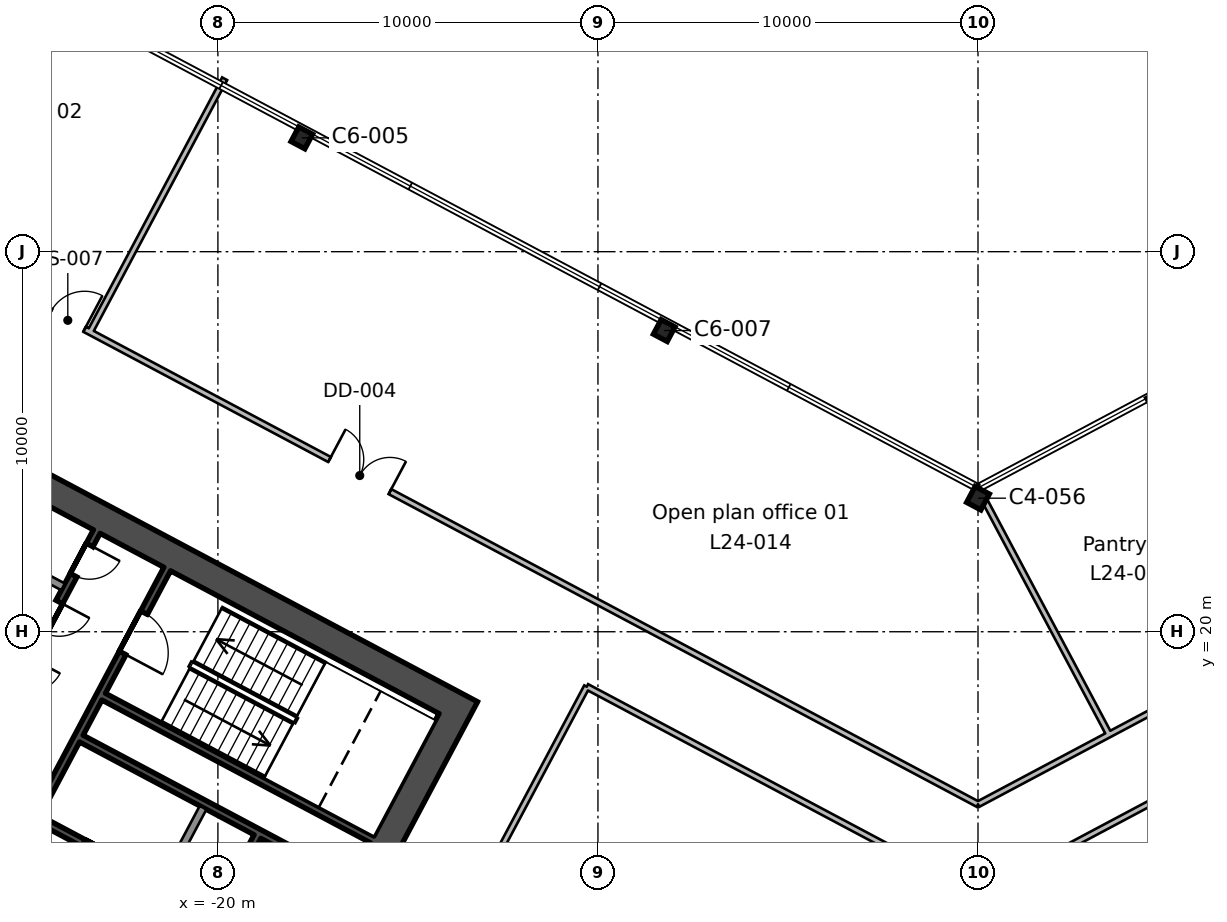
"""IFC4 building model, lengths in metres.
Left out: names, types, materials, properties, quantities, classifications, styles, units other than length and angle.
Written with IfcOpenShell. Run it as: python <this file> out.ifc"""

import sys

from ifc_helpers import new_model, si_unit, direction, frame, frame_2d, origin, origin_2d, place, context, subcontext, project, spatial, rectangle, i_section, extrude, element, fill, save


model = new_model("IFC4")
c1 = context("Model", 3, precision=1e-05, world=origin(), true_north=direction((0.0, 1.0)))
c2 = subcontext(c1, "Body", "Model", "MODEL_VIEW")
j1 = project(units=[si_unit("LENGTHUNIT", "METRE"), si_unit("PLANEANGLEUNIT", "RADIAN")], contexts=[c1])
p1 = place(None, origin())
s1 = spatial("IfcSite", under=j1, at=p1, CompositionType="ELEMENT")
p2 = place(p1, origin())
s2 = spatial("IfcBuilding", under=s1, at=p2, CompositionType="ELEMENT")
p3 = place(p2, frame((0.0, 0.0, 122.2)))
s3 = spatial("IfcBuildingStorey", under=s2, at=p3, CompositionType="ELEMENT", Elevation=122.2)
p4 = place(p3, frame((0.0, 23.514, 0.0), z_axis=(0.0, 0.0, 1.0), x_axis=(-0.882947592859, 0.469471562786, 0.0)))
e1 = element("IfcColumn", 1, at=p4, inside=s3, PredefinedType="COLUMN", context=c2, shape_type="SweptSolid", body=[
    extrude(i_section(OverallWidth=0.424, OverallDepth=0.475, WebThickness=0.048, FlangeThickness=0.077, FilletRadius=0.015, at=origin_2d()), origin(), (0.0, 0.0, 1.0), 4.0),
])
for number, where, z_axis, x_axis in (
    (2, (4.725, 26.047, 0.0), (0.0, 0.0, 1.0), (-0.883, -0.469, 0.0)),
    (3, (-8.257, 27.925, 0.0), (0.0, 0.0, 1.0), (-0.883, 0.469, 0.0)),
    (4, (-17.792, 32.995, 0.0), (0.0, 0.0, 1.0), (-0.883, 0.469, 0.0)),
):
    element("IfcColumn", number, at=place(p3, frame(where, z_axis=z_axis, x_axis=x_axis)), inside=s3, PredefinedType="COLUMN", context=c2, shape_type="SweptSolid", body=[
        extrude(i_section(OverallWidth=0.412, OverallDepth=0.434, WebThickness=0.036, FlangeThickness=0.057, FilletRadius=0.015, at=origin_2d()), origin(), (0.0, 0.0, 1.0), 4.0),
    ])
p5 = place(p3, frame((-13.498, 18.333, 0.0), z_axis=(0.0, 0.0, 1.0), x_axis=(-0.469469918705, -0.88294846703, 0.0)))
e5 = element("IfcWall", 5, at=p5, inside=s3, PredefinedType="SHEAR", context=c2, shape_type="SweptSolid", body=[
    extrude(rectangle(XDim=19.7, YDim=0.75, at=frame_2d((9.85, 0.0))), origin(), (0.0, 0.0, 1.0), 4.0),
])
p6 = place(p5, frame((6.85, 0.0, 0.0)))
e6 = element("IfcOpeningElement", 6, at=p6, cuts=e5, PredefinedType="OPENING", context=c2, shape_type="SweptSolid", body=[
    extrude(rectangle(XDim=2.4, YDim=2.4, at=frame_2d((1.2, 1.2))), frame((0.0, 0.385, 0.0), z_axis=(0.0, -1.0, 0.0), x_axis=(1.0, 0.0, 0.0)), (0.0, 0.0, 1.0), 0.77),
])
p7 = place(p3, frame((-14.005, 18.178, 0.0), z_axis=(0.0, 0.0, 1.0), x_axis=(-0.88295010195, 0.469466843842, 0.0)))
e7 = element("IfcWall", 7, at=p7, inside=s3, PredefinedType="SHEAR", context=c2, shape_type="SweptSolid", body=[
    extrude(rectangle(XDim=20.2, YDim=0.75, at=frame_2d((10.1, 0.0))), origin(), (0.0, 0.0, 1.0), 4.0),
])
p8 = place(p3, frame((-18.96, 14.611, 0.0), z_axis=(0.0, 0.0, 1.0), x_axis=(-0.4694473164, -0.882960484464, 0.0)))
e8 = element("IfcWall", 8, at=p8, inside=s3, PredefinedType="SHEAR", context=c2, shape_type="SweptSolid", body=[
    extrude(rectangle(XDim=2.2, YDim=0.2, at=frame_2d((1.1, 0.0))), origin(), (0.0, 0.0, 1.0), 4.0),
])
p9 = place(p3, frame((-20.39, 15.372, 0.0), z_axis=(0.0, 0.0, 1.0), x_axis=(-0.4694473164, -0.882960484464, 0.0)))
e9 = element("IfcWall", 9, at=p9, inside=s3, PredefinedType="SOLIDWALL", context=c2, shape_type="SweptSolid", body=[
    extrude(rectangle(XDim=2.2, YDim=0.2, at=frame_2d((1.1, 0.0))), origin(), (0.0, 0.0, 1.0), 4.0),
])
p10 = place(p3, frame((-21.333, 21.649, 0.0), z_axis=(0.0, 0.0, 1.0), x_axis=(-0.469494272526, -0.882935517501, 0.0)))
e10 = element("IfcWall", 10, at=p10, inside=s3, PredefinedType="SHEAR", context=c2, shape_type="SweptSolid", body=[
    extrude(rectangle(XDim=7.3, YDim=0.2, at=frame_2d((3.65, 0.0))), origin(), (0.0, 0.0, 1.0), 4.0),
])
p11 = place(p10, frame((1.3, 0.0, 0.0)))
e11 = element("IfcOpeningElement", 11, at=p11, cuts=e10, PredefinedType="OPENING", context=c2, shape_type="SweptSolid", body=[
    extrude(rectangle(XDim=1.2, YDim=2.1, at=frame_2d((0.6, 1.05))), frame((0.0, 0.11, 0.0), z_axis=(0.0, -1.0, 0.0), x_axis=(1.0, 0.0, 0.0)), (0.0, 0.0, 1.0), 0.22),
])
p12 = place(p3, frame((-23.188, 22.635, 0.0), z_axis=(0.0, 0.0, 1.0), x_axis=(-0.469454336211, -0.882956752176, 0.0)))
e12 = element("IfcWall", 12, at=p12, inside=s3, PredefinedType="SHEAR", context=c2, shape_type="SweptSolid", body=[
    extrude(rectangle(XDim=7.3, YDim=0.2, at=frame_2d((3.65, 0.0))), origin(), (0.0, 0.0, 1.0), 4.0),
])
p13 = place(p12, frame((0.4, 0.0, 0.0)))
e13 = element("IfcOpeningElement", 13, at=p13, cuts=e12, PredefinedType="OPENING", context=c2, shape_type="SweptSolid", body=[
    extrude(rectangle(XDim=0.9, YDim=2.1, at=frame_2d((0.45, 1.05))), frame((0.0, 0.11, 0.0), z_axis=(0.0, -1.0, 0.0), x_axis=(1.0, 0.0, 0.0)), (0.0, 0.0, 1.0), 0.22),
])
p14 = place(p12, frame((2.1, 0.0, 0.0)))
e14 = element("IfcOpeningElement", 14, at=p14, cuts=e12, PredefinedType="OPENING", context=c2, shape_type="SweptSolid", body=[
    extrude(rectangle(XDim=0.9, YDim=2.1, at=frame_2d((0.45, 1.05))), frame((0.0, 0.11, 0.0), z_axis=(0.0, -1.0, 0.0), x_axis=(1.0, 0.0, 0.0)), (0.0, 0.0, 1.0), 0.22),
])
p15 = place(p12, frame((3.75, 0.0, 0.0)))
e15 = element("IfcOpeningElement", 15, at=p15, cuts=e12, PredefinedType="OPENING", context=c2, shape_type="SweptSolid", body=[
    extrude(rectangle(XDim=0.9, YDim=2.1, at=frame_2d((0.45, 1.05))), frame((0.0, 0.11, 0.0), z_axis=(0.0, -1.0, 0.0), x_axis=(1.0, 0.0, 0.0)), (0.0, 0.0, 1.0), 0.22),
])
p16 = place(p3, frame((-24.074, 21.181, 0.0), z_axis=(0.0, 0.0, 1.0), x_axis=(-0.882953967957, 0.469459572775, 0.0)))
e16 = element("IfcWall", 16, at=p16, inside=s3, PredefinedType="SOLIDWALL", context=c2, shape_type="SweptSolid", body=[
    extrude(rectangle(XDim=5.2, YDim=0.2, at=frame_2d((2.6, 0.0))), origin(), (0.0, 0.0, 1.0), 4.0),
])
p17 = place(p3, frame((-15.942, 14.536, 0.0), z_axis=(0.0, 0.0, 1.0), x_axis=(-0.882946947542, 0.469472776449, 0.0)))
e17 = element("IfcWall", 17, at=p17, inside=s3, PredefinedType="SHEAR", context=c2, shape_type="SweptSolid", body=[
    extrude(rectangle(XDim=8.0, YDim=0.2, at=frame_2d((4.0, 0.0))), origin(), (0.0, 0.0, 1.0), 4.0),
])
p18 = place(p3, frame((-16.529, 13.432, 0.0), z_axis=(0.0, 0.0, 1.0), x_axis=(-0.88295287151, 0.469461634952, 0.0)))
e18 = element("IfcWall", 18, at=p18, inside=s3, PredefinedType="SHEAR", context=c2, shape_type="SweptSolid", body=[
    extrude(rectangle(XDim=8.0, YDim=0.2, at=frame_2d((4.0, 0.0))), origin(), (0.0, 0.0, 1.0), 4.0),
])
p19 = place(p3, frame((-20.04, 12.581, 0.0), z_axis=(0.0, 0.0, 1.0), x_axis=(-0.882942972946, 0.469480251476, 0.0)))
e19 = element("IfcWall", 19, at=p19, inside=s3, PredefinedType="SHEAR", context=c2, shape_type="SweptSolid", body=[
    extrude(rectangle(XDim=5.4, YDim=0.2, at=frame_2d((2.7, 0.0))), origin(), (0.0, 0.0, 1.0), 4.0),
])
p20 = place(p19, frame((0.36, 0.0, 0.0)))
e20 = element("IfcOpeningElement", 20, at=p20, cuts=e19, PredefinedType="OPENING", context=c2, shape_type="SweptSolid", body=[
    extrude(rectangle(XDim=0.9, YDim=2.1, at=frame_2d((0.45, 1.05))), frame((0.0, 0.11, 0.0), z_axis=(0.0, -1.0, 0.0), x_axis=(1.0, 0.0, 0.0)), (0.0, 0.0, 1.0), 0.22),
])
p21 = place(p19, frame((3.06, 0.0, 0.0)))
e21 = element("IfcOpeningElement", 21, at=p21, cuts=e19, PredefinedType="OPENING", context=c2, shape_type="SweptSolid", body=[
    extrude(rectangle(XDim=0.9, YDim=2.1, at=frame_2d((0.45, 1.05))), frame((0.0, 0.11, 0.0), z_axis=(0.0, -1.0, 0.0), x_axis=(1.0, 0.0, 0.0)), (0.0, 0.0, 1.0), 0.22),
])
p22 = place(p3, frame((-32.47, 32.724, 0.0), z_axis=(0.0, 0.0, 1.0), x_axis=(0.88295243426, -0.469462457321, 0.0)))
e22 = element("IfcWall", 22, at=p22, inside=s3, PredefinedType="PARTITIONING", context=c2, shape_type="SweptSolid", body=[
    extrude(rectangle(XDim=36.774, YDim=0.15, at=frame_2d((18.387, 0.0))), origin(), (0.0, 0.0, 1.0), 3.64),
])
p23 = place(p22, frame((17.45, 0.0, 0.0)))
e23 = element("IfcOpeningElement", 23, at=p23, cuts=e22, PredefinedType="OPENING", context=c2, shape_type="SweptSolid", body=[
    extrude(rectangle(XDim=1.8, YDim=2.1, at=frame_2d((0.9, 1.05))), frame((0.0, 0.085, 0.0), z_axis=(0.0, -1.0, 0.0), x_axis=(1.0, 0.0, 0.0)), (0.0, 0.0, 1.0), 0.17),
])
p24 = place(p22, frame((9.15, 0.0, 0.0)))
e24 = element("IfcOpeningElement", 24, at=p24, cuts=e22, PredefinedType="OPENING", context=c2, shape_type="SweptSolid", body=[
    extrude(rectangle(XDim=1.0, YDim=2.1, at=frame_2d((0.5, 1.05))), frame((0.0, 0.085, 0.0), z_axis=(0.0, -1.0, 0.0), x_axis=(1.0, 0.0, 0.0)), (0.0, 0.0, 1.0), 0.17),
])
p25 = place(p3, frame((0.0, 15.46, 0.0), z_axis=(0.0, 0.0, 1.0), x_axis=(0.882952116052, 0.469463055798, 0.0)))
e25 = element("IfcWall", 25, at=p25, inside=s3, PredefinedType="PARTITIONING", context=c2, shape_type="SweptSolid", body=[
    extrude(rectangle(XDim=18.96, YDim=0.15, at=frame_2d((9.48, 0.0))), origin(), (0.0, 0.0, 1.0), 3.64),
])
p26 = place(p25, frame((9.35, 0.0, 0.0)))
e26 = element("IfcOpeningElement", 26, at=p26, cuts=e25, PredefinedType="OPENING", context=c2, shape_type="SweptSolid", body=[
    extrude(rectangle(XDim=1.0, YDim=2.1, at=frame_2d((0.5, 1.05))), frame((0.0, 0.085, 0.0), z_axis=(0.0, -1.0, 0.0), x_axis=(1.0, 0.0, 0.0)), (0.0, 0.0, 1.0), 0.17),
])
p27 = place(p25, frame((7.7, 0.0, 0.0)))
e27 = element("IfcOpeningElement", 27, at=p27, cuts=e25, PredefinedType="OPENING", context=c2, shape_type="SweptSolid", body=[
    extrude(rectangle(XDim=1.0, YDim=2.1, at=frame_2d((0.5, 1.05))), frame((0.0, 0.085, 0.0), z_axis=(0.0, -1.0, 0.0), x_axis=(1.0, 0.0, 0.0)), (0.0, 0.0, 1.0), 0.17),
])
p28 = place(p3, frame((-19.822, 34.55, 0.0), z_axis=(0.0, 0.0, 1.0), x_axis=(-0.469426325488, -0.88297164447, 0.0)))
e28 = element("IfcWall", 28, at=p28, inside=s3, PredefinedType="PARTITIONING", context=c2, shape_type="SweptSolid", body=[
    extrude(rectangle(XDim=7.55, YDim=0.15, at=frame_2d((3.775, 0.0))), origin(), (0.0, 0.0, 1.0), 3.64),
])
p29 = place(p3, frame((0.191, 23.422, 0.0), z_axis=(0.0, 0.0, 1.0), x_axis=(0.46954180368, -0.882910241529, 0.0)))
e29 = element("IfcWall", 29, at=p29, inside=s3, PredefinedType="PARTITIONING", context=c2, shape_type="SweptSolid", body=[
    extrude(rectangle(XDim=6.941, YDim=0.15, at=frame_2d((3.47, 0.0))), origin(), (0.0, 0.0, 1.0), 3.64),
])
p30 = place(p3, frame((-21.139, -1.841, 0.0), z_axis=(0.0, 0.0, 1.0), x_axis=(0.46947923089, 0.882943515613, 0.0)))
e30 = element("IfcWall", 30, at=p30, inside=s3, PredefinedType="PARTITIONING", context=c2, shape_type="SweptSolid", body=[
    extrude(rectangle(XDim=23.1, YDim=0.15, at=frame_2d((11.55, 0.0))), origin(), (0.0, 0.0, 1.0), 3.64),
])
p31 = place(p30, frame((11.05, 0.0, 0.0)))
e31 = element("IfcOpeningElement", 31, at=p31, cuts=e30, PredefinedType="OPENING", context=c2, shape_type="SweptSolid", body=[
    extrude(rectangle(XDim=1.0, YDim=2.1, at=frame_2d((0.5, 1.05))), frame((0.0, 0.085, 0.0), z_axis=(0.0, -1.0, 0.0), x_axis=(1.0, 0.0, 0.0)), (0.0, 0.0, 1.0), 0.17),
])
p32 = place(p3, frame((-10.294, 18.555, 0.0), z_axis=(0.0, 0.0, 1.0), x_axis=(0.882931500577, -0.469501826714, 0.0)))
e32 = element("IfcWall", 32, at=p32, inside=s3, PredefinedType="PARTITIONING", context=c2, shape_type="SweptSolid", body=[
    extrude(rectangle(XDim=10.127, YDim=0.15, at=frame_2d((5.064, 0.0))), origin(), (0.0, 0.0, 1.0), 3.64),
])
p33 = place(p3, frame((6.762, 16.677, 0.0), z_axis=(0.0, 0.0, 1.0), x_axis=(-0.882917024124, -0.469529049699, 0.0)))
e33 = element("IfcWall", 33, at=p33, inside=s3, PredefinedType="PARTITIONING", context=c2, shape_type="SweptSolid", body=[
    extrude(rectangle(XDim=6.127, YDim=0.15, at=frame_2d((3.063, 0.0))), origin(), (0.0, 0.0, 1.0), 3.64),
])
p34 = place(p11, origin())
e34 = element("IfcDoor", 34, at=p34, inside=s3, OperationType="SINGLE_SWING_RIGHT", PredefinedType="DOOR", context=c2, shape_type="SweptSolid", body=[
    extrude(rectangle(XDim=1.2, YDim=2.1, at=frame_2d((0.6, 1.05))), frame((0.0, 0.025, 0.0), z_axis=(0.0, -1.0, 0.0), x_axis=(1.0, 0.0, 0.0)), (0.0, 0.0, 1.0), 0.05),
])
fill(e11, e34)
p35 = place(p21, origin())
e35 = element("IfcDoor", 35, at=p35, inside=s3, OperationType="SINGLE_SWING_LEFT", PredefinedType="DOOR", context=c2, shape_type="SweptSolid", body=[
    extrude(rectangle(XDim=0.9, YDim=2.1, at=frame_2d((0.45, 1.05))), frame((0.0, 0.025, 0.0), z_axis=(0.0, -1.0, 0.0), x_axis=(1.0, 0.0, 0.0)), (0.0, 0.0, 1.0), 0.05),
])
fill(e21, e35)
p36 = place(p13, origin())
e36 = element("IfcDoor", 36, at=p36, inside=s3, OperationType="SINGLE_SWING_LEFT", PredefinedType="DOOR", context=c2, shape_type="SweptSolid", body=[
    extrude(rectangle(XDim=0.9, YDim=2.1, at=frame_2d((0.45, 1.05))), frame((0.0, 0.025, 0.0), z_axis=(0.0, -1.0, 0.0), x_axis=(1.0, 0.0, 0.0)), (0.0, 0.0, 1.0), 0.05),
])
fill(e13, e36)
p37 = place(p14, origin())
e37 = element("IfcDoor", 37, at=p37, inside=s3, OperationType="SINGLE_SWING_LEFT", PredefinedType="DOOR", context=c2, shape_type="SweptSolid", body=[
    extrude(rectangle(XDim=0.9, YDim=2.1, at=frame_2d((0.45, 1.05))), frame((0.0, 0.025, 0.0), z_axis=(0.0, -1.0, 0.0), x_axis=(1.0, 0.0, 0.0)), (0.0, 0.0, 1.0), 0.05),
])
fill(e14, e37)
p38 = place(p23, origin())
e38 = element("IfcDoor", 38, at=p38, inside=s3, OperationType="DOUBLE_DOOR_SINGLE_SWING", PredefinedType="DOOR", context=c2, shape_type="SweptSolid", body=[
    extrude(rectangle(XDim=1.8, YDim=2.1, at=frame_2d((0.9, 1.05))), frame((0.0, 0.025, 0.0), z_axis=(0.0, -1.0, 0.0), x_axis=(1.0, 0.0, 0.0)), (0.0, 0.0, 1.0), 0.05),
])
fill(e23, e38)
p39 = place(p24, origin())
e39 = element("IfcDoor", 39, at=p39, inside=s3, OperationType="SINGLE_SWING_RIGHT", PredefinedType="DOOR", context=c2, shape_type="SweptSolid", body=[
    extrude(rectangle(XDim=1.0, YDim=2.1, at=frame_2d((0.5, 1.05))), frame((0.0, 0.025, 0.0), z_axis=(0.0, -1.0, 0.0), x_axis=(1.0, 0.0, 0.0)), (0.0, 0.0, 1.0), 0.05),
])
fill(e24, e39)
save(model, sys.argv[1])
